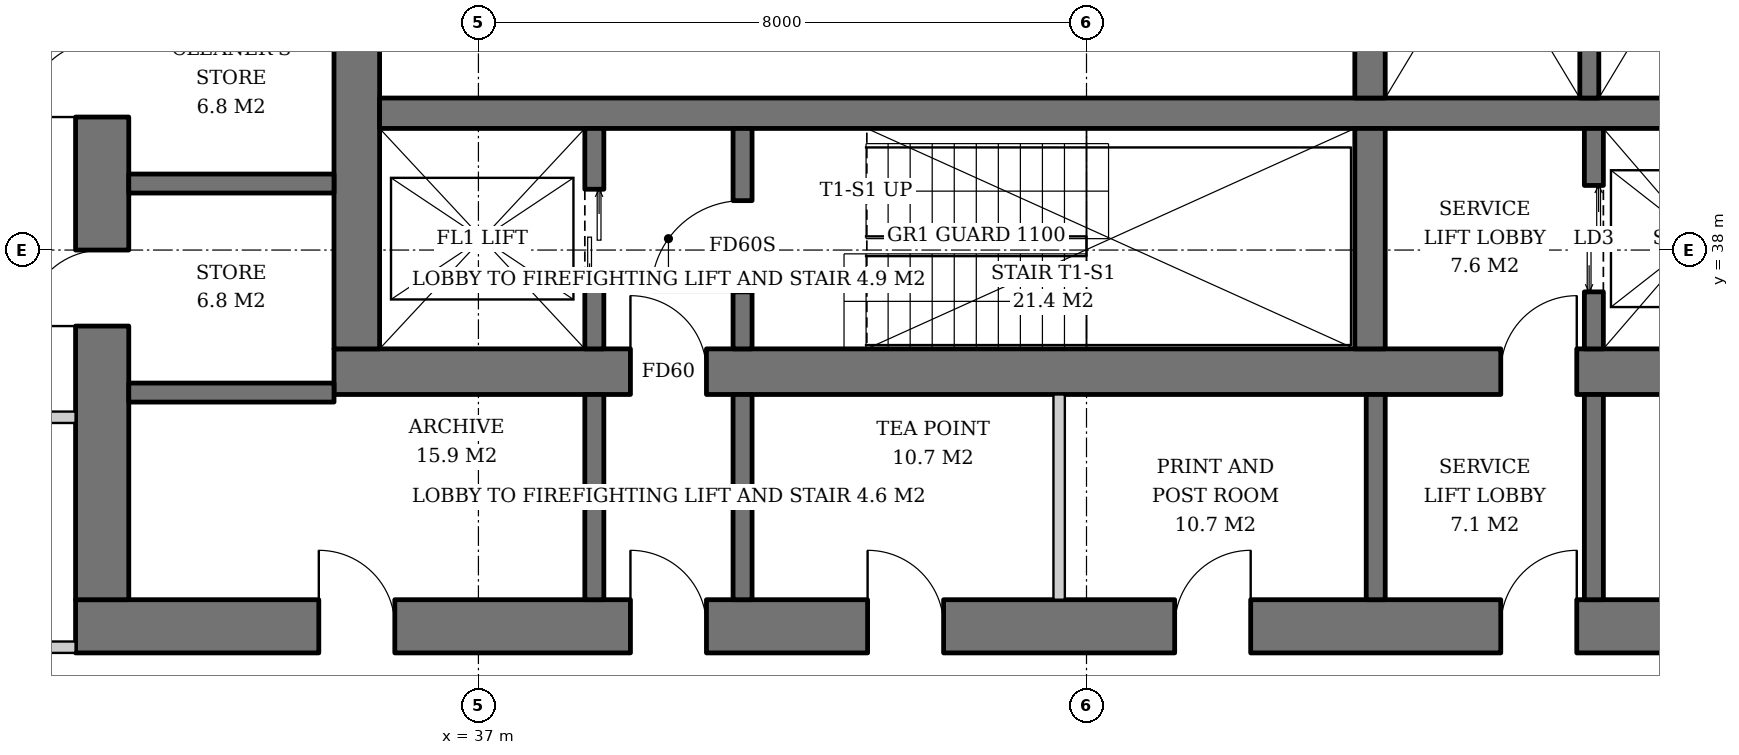
"""IFC4 building model, lengths in metres.
Left out: names, types, materials, properties, quantities, classifications, styles, units other than length and angle.
Written with IfcOpenShell. Run it as: python <this file> out.ifc"""

import sys

from ifc_helpers import new_model, si_unit, direction, frame, frame_2d, origin, place, context, subcontext, project, spatial, rectangle, extrude, element, fill, save


model = new_model("IFC4")
c1 = context("Model", 3, precision=1e-05, world=origin(), true_north=direction((0.0, 1.0)))
c2 = subcontext(c1, "Body", "Model", "MODEL_VIEW")
j1 = project(units=[si_unit("LENGTHUNIT", "METRE"), si_unit("PLANEANGLEUNIT", "RADIAN")], contexts=[c1])
p1 = place(None, origin())
s1 = spatial("IfcSite", under=j1, at=p1, CompositionType="ELEMENT")
p2 = place(p1, origin())
s2 = spatial("IfcBuilding", under=s1, at=p2, CompositionType="ELEMENT")
p3 = place(p2, frame((0.0, 0.0, 138.8)))
s3 = spatial("IfcBuildingStorey", under=s2, at=p3, CompositionType="ELEMENT", Elevation=138.8)
p4 = place(p3, frame((35.1, 36.4, 0.0), z_axis=(0.0, 0.0, 1.0), x_axis=(1.0, 0.0, 0.0)))
e1 = element("IfcWall", 1, at=p4, inside=s3, PredefinedType="SHEAR", context=c2, shape_type="SweptSolid", body=[
    extrude(rectangle(XDim=19.8, YDim=0.6, at=frame_2d((9.9, 0.0))), origin(), (0.0, 0.0, 1.0), 3.8),
])
p5 = place(p4, frame((3.9, 0.0, 0.0)))
e2 = element("IfcOpeningElement", 2, at=p5, cuts=e1, PredefinedType="OPENING", context=c2, shape_type="SweptSolid", body=[
    extrude(rectangle(XDim=1.0, YDim=2.1, at=frame_2d((0.5, 1.05))), frame((0.0, 0.31, 0.0), z_axis=(0.0, -1.0, 0.0), x_axis=(1.0, 0.0, 0.0)), (0.0, 0.0, 1.0), 0.62),
])
p6 = place(p4, frame((15.35, 0.0, 0.0)))
e3 = element("IfcOpeningElement", 3, at=p6, cuts=e1, PredefinedType="OPENING", context=c2, shape_type="SweptSolid", body=[
    extrude(rectangle(XDim=1.0, YDim=2.1, at=frame_2d((0.5, 1.05))), frame((0.0, 0.31, 0.0), z_axis=(0.0, -1.0, 0.0), x_axis=(1.0, 0.0, 0.0)), (0.0, 0.0, 1.0), 0.62),
])
p7 = place(p3, frame((35.4, 36.7, 0.0), z_axis=(0.0, 0.0, 1.0), x_axis=(0.0, 1.0, 0.0)))
e4 = element("IfcWall", 4, at=p7, inside=s3, PredefinedType="SHEAR", context=c2, shape_type="SweptSolid", body=[
    extrude(rectangle(XDim=18.6, YDim=0.6, at=frame_2d((9.3, 0.0))), origin(), (0.0, 0.0, 1.0), 3.8),
])
p8 = place(p7, frame((8.4, 0.0, 0.0)))
e5 = element("IfcOpeningElement", 5, at=p8, cuts=e4, PredefinedType="OPENING", context=c2, shape_type="SweptSolid", body=[
    extrude(rectangle(XDim=1.8, YDim=2.4, at=frame_2d((0.9, 1.2))), frame((0.0, 0.31, 0.0), z_axis=(0.0, -1.0, 0.0), x_axis=(1.0, 0.0, 0.0)), (0.0, 0.0, 1.0), 0.62),
])
p9 = place(p3, frame((31.7, 33.05, 0.0), z_axis=(0.0, 0.0, 1.0), x_axis=(1.0, 0.0, 0.0)))
e6 = element("IfcWall", 6, at=p9, inside=s3, PredefinedType="SHEAR", context=c2, shape_type="SweptSolid", body=[
    extrude(rectangle(XDim=26.6, YDim=0.7, at=frame_2d((13.3, 0.0))), origin(), (0.0, 0.0, 1.0), 3.8),
])
p10 = place(p9, frame((7.3, 0.0, 0.0)))
e7 = element("IfcOpeningElement", 7, at=p10, cuts=e6, PredefinedType="OPENING", context=c2, shape_type="SweptSolid", body=[
    extrude(rectangle(XDim=1.0, YDim=2.1, at=frame_2d((0.5, 1.05))), frame((0.0, 0.36, 0.0), z_axis=(0.0, -1.0, 0.0), x_axis=(1.0, 0.0, 0.0)), (0.0, 0.0, 1.0), 0.72),
])
p11 = place(p9, frame((18.75, 0.0, 0.0)))
e8 = element("IfcOpeningElement", 8, at=p11, cuts=e6, PredefinedType="OPENING", context=c2, shape_type="SweptSolid", body=[
    extrude(rectangle(XDim=1.0, YDim=2.1, at=frame_2d((0.5, 1.05))), frame((0.0, 0.36, 0.0), z_axis=(0.0, -1.0, 0.0), x_axis=(1.0, 0.0, 0.0)), (0.0, 0.0, 1.0), 0.72),
])
p12 = place(p9, frame((3.2, 0.0, 0.0)))
e9 = element("IfcOpeningElement", 9, at=p12, cuts=e6, PredefinedType="OPENING", context=c2, shape_type="SweptSolid", body=[
    extrude(rectangle(XDim=1.0, YDim=2.1, at=frame_2d((0.5, 1.05))), frame((0.0, 0.36, 0.0), z_axis=(0.0, -1.0, 0.0), x_axis=(1.0, 0.0, 0.0)), (0.0, 0.0, 1.0), 0.72),
])
p13 = place(p9, frame((10.42, 0.0, 0.0)))
e10 = element("IfcOpeningElement", 10, at=p13, cuts=e6, PredefinedType="OPENING", context=c2, shape_type="SweptSolid", body=[
    extrude(rectangle(XDim=1.0, YDim=2.1, at=frame_2d((0.5, 1.05))), frame((0.0, 0.36, 0.0), z_axis=(0.0, -1.0, 0.0), x_axis=(1.0, 0.0, 0.0)), (0.0, 0.0, 1.0), 0.72),
])
p14 = place(p9, frame((14.46, 0.0, 0.0)))
e11 = element("IfcOpeningElement", 11, at=p14, cuts=e6, PredefinedType="OPENING", context=c2, shape_type="SweptSolid", body=[
    extrude(rectangle(XDim=1.0, YDim=2.1, at=frame_2d((0.5, 1.05))), frame((0.0, 0.36, 0.0), z_axis=(0.0, -1.0, 0.0), x_axis=(1.0, 0.0, 0.0)), (0.0, 0.0, 1.0), 0.72),
])
p15 = place(p9, frame((22.5, 0.0, 0.0)))
e12 = element("IfcOpeningElement", 12, at=p15, cuts=e6, PredefinedType="OPENING", context=c2, shape_type="SweptSolid", body=[
    extrude(rectangle(XDim=1.0, YDim=2.1, at=frame_2d((0.5, 1.05))), frame((0.0, 0.36, 0.0), z_axis=(0.0, -1.0, 0.0), x_axis=(1.0, 0.0, 0.0)), (0.0, 0.0, 1.0), 0.72),
])
p16 = place(p3, frame((32.05, 33.4, 0.0), z_axis=(0.0, 0.0, 1.0), x_axis=(0.0, 1.0, 0.0)))
e13 = element("IfcWall", 13, at=p16, inside=s3, PredefinedType="SHEAR", context=c2, shape_type="SweptSolid", body=[
    extrude(rectangle(XDim=25.2, YDim=0.7, at=frame_2d((12.6, 0.0))), origin(), (0.0, 0.0, 1.0), 3.8),
])
p17 = place(p16, frame((11.7, 0.0, 0.0)))
e14 = element("IfcOpeningElement", 14, at=p17, cuts=e13, PredefinedType="OPENING", context=c2, shape_type="SweptSolid", body=[
    extrude(rectangle(XDim=1.8, YDim=2.4, at=frame_2d((0.9, 1.2))), frame((0.0, 0.36, 0.0), z_axis=(0.0, -1.0, 0.0), x_axis=(1.0, 0.0, 0.0)), (0.0, 0.0, 1.0), 0.72),
])
p18 = place(p16, frame((3.6, 0.0, 0.0)))
e15 = element("IfcOpeningElement", 15, at=p18, cuts=e13, PredefinedType="OPENING", context=c2, shape_type="SweptSolid", body=[
    extrude(rectangle(XDim=1.0, YDim=2.1, at=frame_2d((0.5, 1.05))), frame((0.0, 0.36, 0.0), z_axis=(0.0, -1.0, 0.0), x_axis=(1.0, 0.0, 0.0)), (0.0, 0.0, 1.0), 0.72),
])
p19 = place(p16, frame((6.35, 0.0, 0.0)))
e16 = element("IfcOpeningElement", 16, at=p19, cuts=e13, PredefinedType="OPENING", context=c2, shape_type="SweptSolid", body=[
    extrude(rectangle(XDim=1.0, YDim=2.1, at=frame_2d((0.5, 1.05))), frame((0.0, 0.36, 0.0), z_axis=(0.0, -1.0, 0.0), x_axis=(1.0, 0.0, 0.0)), (0.0, 0.0, 1.0), 0.72),
])
p20 = place(p16, frame((9.1, 0.0, 0.0)))
e17 = element("IfcOpeningElement", 17, at=p20, cuts=e13, PredefinedType="OPENING", context=c2, shape_type="SweptSolid", body=[
    extrude(rectangle(XDim=1.0, YDim=2.1, at=frame_2d((0.5, 1.05))), frame((0.0, 0.36, 0.0), z_axis=(0.0, -1.0, 0.0), x_axis=(1.0, 0.0, 0.0)), (0.0, 0.0, 1.0), 0.72),
])
p21 = place(p16, frame((15.1, 0.0, 0.0)))
e18 = element("IfcOpeningElement", 18, at=p21, cuts=e13, PredefinedType="OPENING", context=c2, shape_type="SweptSolid", body=[
    extrude(rectangle(XDim=1.0, YDim=2.1, at=frame_2d((0.5, 1.05))), frame((0.0, 0.36, 0.0), z_axis=(0.0, -1.0, 0.0), x_axis=(1.0, 0.0, 0.0)), (0.0, 0.0, 1.0), 0.72),
])
p22 = place(p16, frame((17.85, 0.0, 0.0)))
e19 = element("IfcOpeningElement", 19, at=p22, cuts=e13, PredefinedType="OPENING", context=c2, shape_type="SweptSolid", body=[
    extrude(rectangle(XDim=1.0, YDim=2.1, at=frame_2d((0.5, 1.05))), frame((0.0, 0.36, 0.0), z_axis=(0.0, -1.0, 0.0), x_axis=(1.0, 0.0, 0.0)), (0.0, 0.0, 1.0), 0.72),
])
p23 = place(p3, frame((35.7, 39.8, 0.0), z_axis=(0.0, 0.0, 1.0), x_axis=(1.0, 0.0, 0.0)))
e20 = element("IfcWall", 20, at=p23, inside=s3, PredefinedType="SHEAR", context=c2, shape_type="SweptSolid", body=[
    extrude(rectangle(XDim=18.6, YDim=0.4, at=frame_2d((9.3, 0.0))), origin(), (0.0, 0.0, 1.0), 3.8),
])
p24 = place(p3, frame((48.73, 36.7, 0.0), z_axis=(0.0, 0.0, 1.0), x_axis=(0.0, 1.0, 0.0)))
e21 = element("IfcWall", 21, at=p24, inside=s3, PredefinedType="SHEAR", context=c2, shape_type="SweptSolid", body=[
    extrude(rectangle(XDim=2.9, YDim=0.4, at=frame_2d((1.45, 0.0))), origin(), (0.0, 0.0, 1.0), 3.8),
])
p25 = place(p3, frame((48.73, 40.0, 0.0), z_axis=(0.0, 0.0, 1.0), x_axis=(0.0, 1.0, 0.0)))
e22 = element("IfcWall", 22, at=p25, inside=s3, PredefinedType="SHEAR", context=c2, shape_type="SweptSolid", body=[
    extrude(rectangle(XDim=12.0, YDim=0.4, at=frame_2d((6.0, 0.0))), origin(), (0.0, 0.0, 1.0), 3.8),
])
p26 = place(p3, frame((38.525, 36.7, 0.0), z_axis=(0.0, 0.0, 1.0), x_axis=(0.0, 1.0, 0.0)))
e23 = element("IfcWall", 23, at=p26, inside=s3, PredefinedType="SHEAR", context=c2, shape_type="SweptSolid", body=[
    extrude(rectangle(XDim=2.9, YDim=0.25, at=frame_2d((1.45, 0.0))), origin(), (0.0, 0.0, 1.0), 3.8),
])
p27 = place(p26, frame((0.8, 0.0, 0.0)))
e24 = element("IfcOpeningElement", 24, at=p27, cuts=e23, PredefinedType="OPENING", context=c2, shape_type="SweptSolid", body=[
    extrude(rectangle(XDim=1.3, YDim=2.2, at=frame_2d((0.65, 1.1))), frame((0.0, 0.135, 0.0), z_axis=(0.0, -1.0, 0.0), x_axis=(1.0, 0.0, 0.0)), (0.0, 0.0, 1.0), 0.27),
])
p28 = place(p3, frame((40.475, 36.7, 0.0), z_axis=(0.0, 0.0, 1.0), x_axis=(0.0, 1.0, 0.0)))
e25 = element("IfcWall", 25, at=p28, inside=s3, PredefinedType="SHEAR", context=c2, shape_type="SweptSolid", body=[
    extrude(rectangle(XDim=2.9, YDim=0.25, at=frame_2d((1.45, 0.0))), origin(), (0.0, 0.0, 1.0), 3.8),
])
p29 = place(p28, frame((0.75, 0.0, 0.0)))
e26 = element("IfcOpeningElement", 26, at=p29, cuts=e25, PredefinedType="OPENING", context=c2, shape_type="SweptSolid", body=[
    extrude(rectangle(XDim=1.2, YDim=2.1, at=frame_2d((0.6, 1.05))), frame((0.0, 0.135, 0.0), z_axis=(0.0, -1.0, 0.0), x_axis=(1.0, 0.0, 0.0)), (0.0, 0.0, 1.0), 0.27),
])
p30 = place(p3, frame((51.675, 36.7, 0.0), z_axis=(0.0, 0.0, 1.0), x_axis=(0.0, 1.0, 0.0)))
e27 = element("IfcWall", 27, at=p30, inside=s3, PredefinedType="SHEAR", context=c2, shape_type="SweptSolid", body=[
    extrude(rectangle(XDim=2.9, YDim=0.25, at=frame_2d((1.45, 0.0))), origin(), (0.0, 0.0, 1.0), 3.8),
])
p31 = place(p30, frame((0.75, 0.0, 0.0)))
e28 = element("IfcOpeningElement", 28, at=p31, cuts=e27, PredefinedType="OPENING", context=c2, shape_type="SweptSolid", body=[
    extrude(rectangle(XDim=1.4, YDim=2.4, at=frame_2d((0.7, 1.2))), frame((0.0, 0.135, 0.0), z_axis=(0.0, -1.0, 0.0), x_axis=(1.0, 0.0, 0.0)), (0.0, 0.0, 1.0), 0.27),
])
p32 = place(p3, frame((51.615, 44.25, 0.0), z_axis=(0.0, 0.0, 1.0), x_axis=(0.0, -1.0, 0.0)))
e29 = element("IfcWall", 29, at=p32, inside=s3, PredefinedType="SHEAR", context=c2, shape_type="SweptSolid", body=[
    extrude(rectangle(XDim=4.25, YDim=0.25, at=frame_2d((2.125, 0.0))), origin(), (0.0, 0.0, 1.0), 3.8),
])
for number, where, z_axis, x_axis in (
    (30, (32.4, 36.125, 0.0), (0.0, 0.0, 1.0), (1.0, 0.0, 0.0)),
    (31, (32.4, 38.875, 0.0), (0.0, 0.0, 1.0), (1.0, 0.0, 0.0)),
):
    element("IfcWall", number, at=place(p3, frame(where, z_axis=z_axis, x_axis=x_axis)), inside=s3, PredefinedType="SHEAR", context=c2, shape_type="SweptSolid", body=[
        extrude(rectangle(XDim=2.7, YDim=0.25, at=frame_2d((1.35, 0.0))), origin(), (0.0, 0.0, 1.0), 3.8),
    ])
for number, where, z_axis, x_axis in (
    (32, (38.525, 33.4, 0.0), (0.0, 0.0, 1.0), (0.0, 1.0, 0.0)),
    (33, (40.475, 33.4, 0.0), (0.0, 0.0, 1.0), (0.0, 1.0, 0.0)),
    (34, (48.805, 33.4, 0.0), (0.0, 0.0, 1.0), (0.0, 1.0, 0.0)),
    (35, (51.675, 33.4, 0.0), (0.0, 0.0, 1.0), (0.0, 1.0, 0.0)),
):
    element("IfcWall", number, at=place(p3, frame(where, z_axis=z_axis, x_axis=x_axis)), inside=s3, PredefinedType="SOLIDWALL", context=c2, shape_type="SweptSolid", body=[
        extrude(rectangle(XDim=2.7, YDim=0.25, at=frame_2d((1.35, 0.0))), origin(), (0.0, 0.0, 1.0), 3.62),
    ])
p33 = place(p3, frame((44.64, 33.4, 0.0), z_axis=(0.0, 0.0, 1.0), x_axis=(0.0, 1.0, 0.0)))
e36 = element("IfcWall", 36, at=p33, inside=s3, PredefinedType="SOLIDWALL", context=c2, shape_type="SweptSolid", body=[
    extrude(rectangle(XDim=2.7, YDim=0.15, at=frame_2d((1.35, 0.0))), origin(), (0.0, 0.0, 1.0), 3.62),
])
for number, where, z_axis, x_axis in (
    (37, (31.7, 35.8, 0.0), (0.0, 0.0, 1.0), (-1.0, 0.0, 0.0)),
    (38, (31.7, 32.775, 0.0), (0.0, 0.0, 1.0), (-1.0, 0.0, 0.0)),
):
    element("IfcWall", number, at=place(p3, frame(where, z_axis=z_axis, x_axis=x_axis)), inside=s3, PredefinedType="PARTITIONING", context=c2, shape_type="SweptSolid", body=[
        extrude(rectangle(XDim=1.725, YDim=0.15, at=frame_2d((0.862, 0.0))), origin(), (0.0, 0.0, 1.0), 3.62),
    ])
p34 = place(p27, origin())
e39 = element("IfcDoor", 39, at=p34, inside=s3, OperationType="DOUBLE_DOOR_SLIDING", PredefinedType="DOOR", context=c2, shape_type="SweptSolid", body=[
    extrude(rectangle(XDim=1.3, YDim=2.2, at=frame_2d((0.65, 1.1))), frame((0.0, 0.025, 0.0), z_axis=(0.0, -1.0, 0.0), x_axis=(1.0, 0.0, 0.0)), (0.0, 0.0, 1.0), 0.05),
])
fill(e24, e39)
p35 = place(p29, origin())
e40 = element("IfcDoor", 40, at=p35, inside=s3, OperationType="SINGLE_SWING_LEFT", PredefinedType="DOOR", context=c2, shape_type="SweptSolid", body=[
    extrude(rectangle(XDim=1.2, YDim=2.1, at=frame_2d((0.6, 1.05))), frame((0.0, 0.025, 0.0), z_axis=(0.0, -1.0, 0.0), x_axis=(1.0, 0.0, 0.0)), (0.0, 0.0, 1.0), 0.05),
])
fill(e26, e40)
p36 = place(p31, origin())
e41 = element("IfcDoor", 41, at=p36, inside=s3, OperationType="DOUBLE_DOOR_SLIDING", PredefinedType="DOOR", context=c2, shape_type="SweptSolid", body=[
    extrude(rectangle(XDim=1.4, YDim=2.4, at=frame_2d((0.7, 1.2))), frame((0.0, 0.025, 0.0), z_axis=(0.0, -1.0, 0.0), x_axis=(1.0, 0.0, 0.0)), (0.0, 0.0, 1.0), 0.05),
])
fill(e28, e41)
p37 = place(p5, origin())
e42 = element("IfcDoor", 42, at=p37, inside=s3, OperationType="SINGLE_SWING_LEFT", PredefinedType="DOOR", context=c2, shape_type="SweptSolid", body=[
    extrude(rectangle(XDim=1.0, YDim=2.1, at=frame_2d((0.5, 1.05))), frame((0.0, 0.025, 0.0), z_axis=(0.0, -1.0, 0.0), x_axis=(1.0, 0.0, 0.0)), (0.0, 0.0, 1.0), 0.05),
])
fill(e2, e42)
p38 = place(p6, origin())
e43 = element("IfcDoor", 43, at=p38, inside=s3, OperationType="SINGLE_SWING_RIGHT", PredefinedType="DOOR", context=c2, shape_type="SweptSolid", body=[
    extrude(rectangle(XDim=1.0, YDim=2.1, at=frame_2d((0.5, 1.05))), frame((0.0, 0.025, 0.0), z_axis=(0.0, -1.0, 0.0), x_axis=(1.0, 0.0, 0.0)), (0.0, 0.0, 1.0), 0.05),
])
fill(e3, e43)
p39 = place(p10, origin())
e44 = element("IfcDoor", 44, at=p39, inside=s3, OperationType="SINGLE_SWING_LEFT", PredefinedType="DOOR", context=c2, shape_type="SweptSolid", body=[
    extrude(rectangle(XDim=1.0, YDim=2.1, at=frame_2d((0.5, 1.05))), frame((0.0, 0.025, 0.0), z_axis=(0.0, -1.0, 0.0), x_axis=(1.0, 0.0, 0.0)), (0.0, 0.0, 1.0), 0.05),
])
fill(e7, e44)
p40 = place(p11, origin())
e45 = element("IfcDoor", 45, at=p40, inside=s3, OperationType="SINGLE_SWING_RIGHT", PredefinedType="DOOR", context=c2, shape_type="SweptSolid", body=[
    extrude(rectangle(XDim=1.0, YDim=2.1, at=frame_2d((0.5, 1.05))), frame((0.0, 0.025, 0.0), z_axis=(0.0, -1.0, 0.0), x_axis=(1.0, 0.0, 0.0)), (0.0, 0.0, 1.0), 0.05),
])
fill(e8, e45)
p41 = place(p18, origin())
e46 = element("IfcDoor", 46, at=p41, inside=s3, OperationType="SINGLE_SWING_LEFT", PredefinedType="DOOR", context=c2, shape_type="SweptSolid", body=[
    extrude(rectangle(XDim=1.0, YDim=2.1, at=frame_2d((0.5, 1.05))), frame((0.0, -0.29, 0.0), z_axis=(0.0, -1.0, 0.0), x_axis=(1.0, 0.0, 0.0)), (0.0, 0.0, 1.0), 0.05),
])
fill(e15, e46)
p42 = place(p19, origin())
e47 = element("IfcDoor", 47, at=p42, inside=s3, OperationType="SINGLE_SWING_LEFT", PredefinedType="DOOR", context=c2, shape_type="SweptSolid", body=[
    extrude(rectangle(XDim=1.0, YDim=2.1, at=frame_2d((0.5, 1.05))), frame((0.0, -0.29, 0.0), z_axis=(0.0, -1.0, 0.0), x_axis=(1.0, 0.0, 0.0)), (0.0, 0.0, 1.0), 0.05),
])
fill(e16, e47)
p43 = place(p12, origin())
e48 = element("IfcDoor", 48, at=p43, inside=s3, OperationType="SINGLE_SWING_LEFT", PredefinedType="DOOR", context=c2, shape_type="SweptSolid", body=[
    extrude(rectangle(XDim=1.0, YDim=2.1, at=frame_2d((0.5, 1.05))), frame((0.0, 0.34, 0.0), z_axis=(0.0, -1.0, 0.0), x_axis=(1.0, 0.0, 0.0)), (0.0, 0.0, 1.0), 0.05),
])
fill(e9, e48)
p44 = place(p13, origin())
e49 = element("IfcDoor", 49, at=p44, inside=s3, OperationType="SINGLE_SWING_LEFT", PredefinedType="DOOR", context=c2, shape_type="SweptSolid", body=[
    extrude(rectangle(XDim=1.0, YDim=2.1, at=frame_2d((0.5, 1.05))), frame((0.0, 0.34, 0.0), z_axis=(0.0, -1.0, 0.0), x_axis=(1.0, 0.0, 0.0)), (0.0, 0.0, 1.0), 0.05),
])
fill(e10, e49)
p45 = place(p14, origin())
e50 = element("IfcDoor", 50, at=p45, inside=s3, OperationType="SINGLE_SWING_RIGHT", PredefinedType="DOOR", context=c2, shape_type="SweptSolid", body=[
    extrude(rectangle(XDim=1.0, YDim=2.1, at=frame_2d((0.5, 1.05))), frame((0.0, 0.34, 0.0), z_axis=(0.0, -1.0, 0.0), x_axis=(1.0, 0.0, 0.0)), (0.0, 0.0, 1.0), 0.05),
])
fill(e11, e50)
save(model, sys.argv[1])
